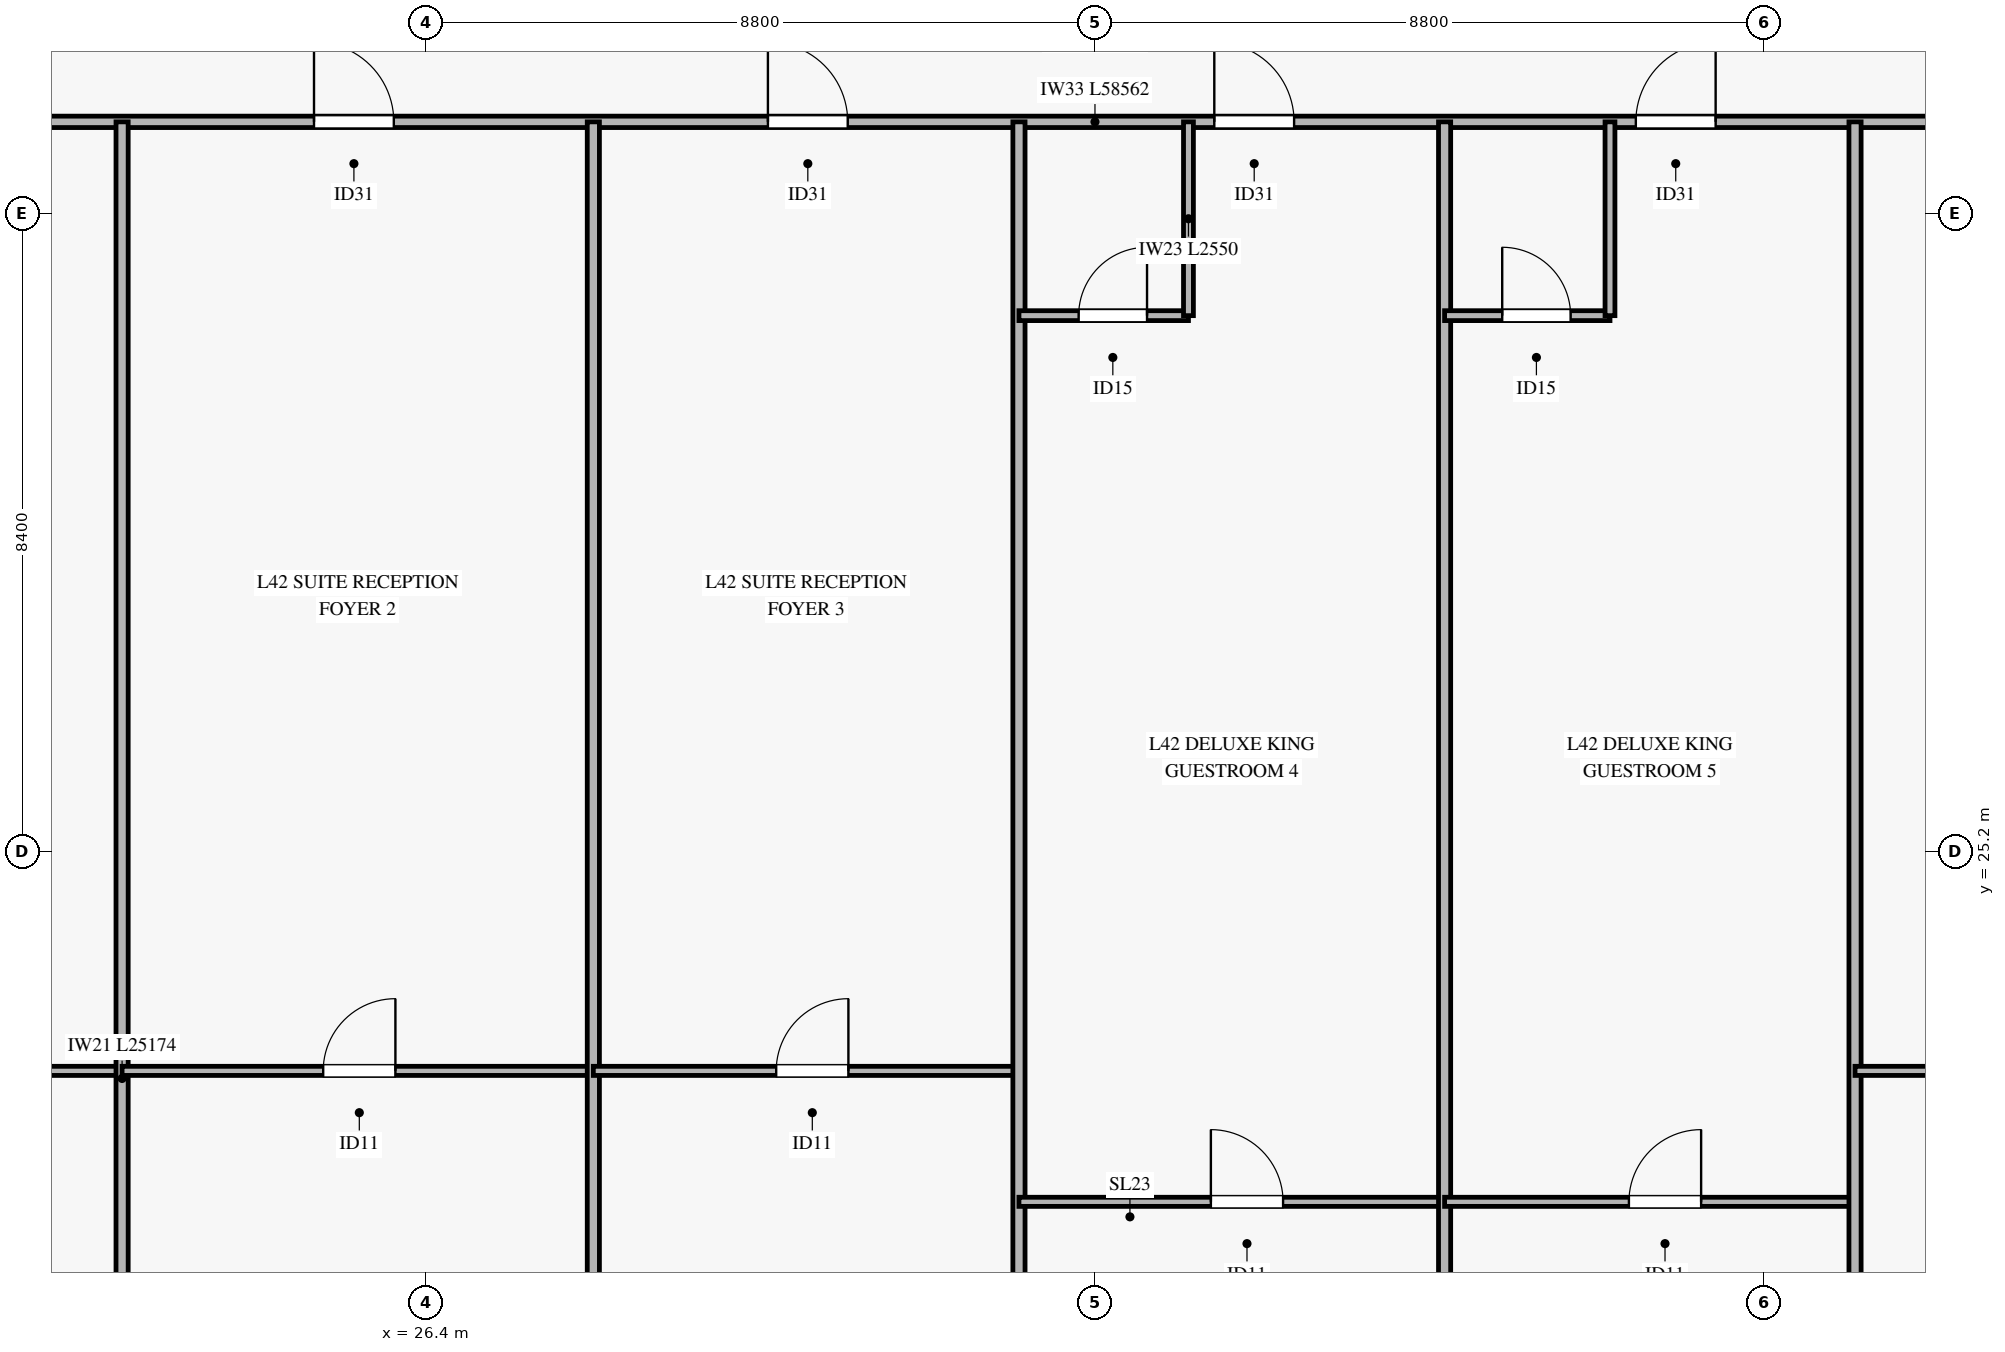
"""IFC4 building model, lengths in metres.
Left out: names, types, materials, properties, quantities, classifications, styles, units other than length and angle.
Written with IfcOpenShell. Run it as: python <this file> out.ifc"""

import sys

from ifc_helpers import new_model, si_unit, direction, frame, frame_2d, origin, place, context, subcontext, project, spatial, rectangle, extrude, source, transform, mapped, element, fill, save


model = new_model("IFC4")
c1 = context("Model", 3, precision=1e-05, world=origin(), true_north=direction((0.0, 1.0)))
c2 = subcontext(c1, "Body", "Model", "MODEL_VIEW")
j1 = project(units=[si_unit("LENGTHUNIT", "METRE"), si_unit("PLANEANGLEUNIT", "RADIAN")], contexts=[c1])
p1 = place(None, origin())
s1 = spatial("IfcSite", under=j1, at=p1, CompositionType="ELEMENT")
p2 = place(p1, origin())
s2 = spatial("IfcBuilding", under=s1, at=p2, CompositionType="ELEMENT")
p3 = place(p2, frame((0.0, 0.0, 170.2)))
s3 = spatial("IfcBuildingStorey", under=s2, at=p3, CompositionType="ELEMENT", Elevation=170.2)
p4 = place(p3, frame((5.919, 34.8, 0.0), z_axis=(0.0, 0.0, 1.0), x_axis=(1.0, 0.0, 0.0)))
e1 = element("IfcWall", 1, at=p4, inside=s3, PredefinedType="PARTITIONING", context=c2, shape_type="SweptSolid", body=[
    extrude(rectangle(XDim=58.562, YDim=0.15, at=frame_2d((29.281, 0.0))), origin(), (0.0, 0.0, 1.0), 2.455),
])
p5 = place(p4, frame((6.556, 0.0, 0.0)))
e2 = element("IfcOpeningElement", 2, at=p5, cuts=e1, PredefinedType="OPENING", context=c2, shape_type="SweptSolid", body=[
    extrude(rectangle(XDim=1.05, YDim=2.15, at=frame_2d((0.525, 1.075))), frame((0.0, 0.085, 0.0), z_axis=(0.0, -1.0, 0.0), x_axis=(1.0, 0.0, 0.0)), (0.0, 0.0, 1.0), 0.17),
])
p6 = place(p4, frame((19.006, 0.0, 0.0)))
e3 = element("IfcOpeningElement", 3, at=p6, cuts=e1, PredefinedType="OPENING", context=c2, shape_type="SweptSolid", body=[
    extrude(rectangle(XDim=1.05, YDim=2.15, at=frame_2d((0.525, 1.075))), frame((0.0, 0.085, 0.0), z_axis=(0.0, -1.0, 0.0), x_axis=(1.0, 0.0, 0.0)), (0.0, 0.0, 1.0), 0.17),
])
p7 = place(p4, frame((24.978, 0.0, 0.0)))
e4 = element("IfcOpeningElement", 4, at=p7, cuts=e1, PredefinedType="OPENING", context=c2, shape_type="SweptSolid", body=[
    extrude(rectangle(XDim=1.05, YDim=2.15, at=frame_2d((0.525, 1.075))), frame((0.0, 0.085, 0.0), z_axis=(0.0, -1.0, 0.0), x_axis=(1.0, 0.0, 0.0)), (0.0, 0.0, 1.0), 0.17),
])
p8 = place(p4, frame((30.851, 0.0, 0.0)))
e5 = element("IfcOpeningElement", 5, at=p8, cuts=e1, PredefinedType="OPENING", context=c2, shape_type="SweptSolid", body=[
    extrude(rectangle(XDim=1.05, YDim=2.15, at=frame_2d((0.525, 1.075))), frame((0.0, 0.085, 0.0), z_axis=(0.0, -1.0, 0.0), x_axis=(1.0, 0.0, 0.0)), (0.0, 0.0, 1.0), 0.17),
])
p9 = place(p4, frame((36.397, 0.0, 0.0)))
e6 = element("IfcOpeningElement", 6, at=p9, cuts=e1, PredefinedType="OPENING", context=c2, shape_type="SweptSolid", body=[
    extrude(rectangle(XDim=1.05, YDim=2.15, at=frame_2d((0.525, 1.075))), frame((0.0, 0.085, 0.0), z_axis=(0.0, -1.0, 0.0), x_axis=(1.0, 0.0, 0.0)), (0.0, 0.0, 1.0), 0.17),
])
p10 = place(p4, frame((46.701, 0.0, 0.0)))
e7 = element("IfcOpeningElement", 7, at=p10, cuts=e1, PredefinedType="OPENING", context=c2, shape_type="SweptSolid", body=[
    extrude(rectangle(XDim=1.05, YDim=2.15, at=frame_2d((0.525, 1.075))), frame((0.0, 0.085, 0.0), z_axis=(0.0, -1.0, 0.0), x_axis=(1.0, 0.0, 0.0)), (0.0, 0.0, 1.0), 0.17),
])
p11 = place(p3, frame((5.919, 22.313, 0.0), z_axis=(0.0, 0.0, 1.0), x_axis=(1.0, 0.0, 0.0)))
e8 = element("IfcWall", 8, at=p11, inside=s3, PredefinedType="PARTITIONING", context=c2, shape_type="SweptSolid", body=[
    extrude(rectangle(XDim=16.481, YDim=0.12, at=frame_2d((8.24, 0.0))), origin(), (0.0, 0.0, 1.0), 2.455),
])
p12 = place(p11, frame((6.878, 0.0, 0.0)))
e9 = element("IfcOpeningElement", 9, at=p12, cuts=e8, PredefinedType="OPENING", context=c2, shape_type="SweptSolid", body=[
    extrude(rectangle(XDim=0.95, YDim=2.1, at=frame_2d((0.475, 1.05))), frame((0.0, 0.07, 0.0), z_axis=(0.0, -1.0, 0.0), x_axis=(1.0, 0.0, 0.0)), (0.0, 0.0, 1.0), 0.14),
])
p13 = place(p3, frame((22.4, 9.626, 0.0), z_axis=(0.0, 0.0, 1.0), x_axis=(0.0, 1.0, 0.0)))
e10 = element("IfcWall", 10, at=p13, inside=s3, PredefinedType="PARTITIONING", context=c2, shape_type="SweptSolid", body=[
    extrude(rectangle(XDim=25.174, YDim=0.16, at=frame_2d((12.587, 0.0))), origin(), (0.0, 0.0, 1.0), 2.755),
])
p14 = place(p3, frame((22.4, 22.313, 0.0), z_axis=(0.0, 0.0, 1.0), x_axis=(1.0, 0.0, 0.0)))
e11 = element("IfcWall", 11, at=p14, inside=s3, PredefinedType="PARTITIONING", context=c2, shape_type="SweptSolid", body=[
    extrude(rectangle(XDim=6.2, YDim=0.12, at=frame_2d((3.1, 0.0))), origin(), (0.0, 0.0, 1.0), 3.27),
])
p15 = place(p14, frame((2.646, 0.0, 0.0)))
e12 = element("IfcOpeningElement", 12, at=p15, cuts=e11, PredefinedType="OPENING", context=c2, shape_type="SweptSolid", body=[
    extrude(rectangle(XDim=0.95, YDim=2.1, at=frame_2d((0.475, 1.05))), frame((0.0, 0.07, 0.0), z_axis=(0.0, -1.0, 0.0), x_axis=(1.0, 0.0, 0.0)), (0.0, 0.0, 1.0), 0.14),
])
p16 = place(p3, frame((28.6, 9.626, 0.0), z_axis=(0.0, 0.0, 1.0), x_axis=(0.0, 1.0, 0.0)))
e13 = element("IfcWall", 13, at=p16, inside=s3, PredefinedType="PARTITIONING", context=c2, shape_type="SweptSolid", body=[
    extrude(rectangle(XDim=25.174, YDim=0.16, at=frame_2d((12.587, 0.0))), origin(), (0.0, 0.0, 1.0), 2.755),
])
p17 = place(p3, frame((28.6, 22.313, 0.0), z_axis=(0.0, 0.0, 1.0), x_axis=(1.0, 0.0, 0.0)))
e14 = element("IfcWall", 14, at=p17, inside=s3, PredefinedType="PARTITIONING", context=c2, shape_type="SweptSolid", body=[
    extrude(rectangle(XDim=5.6, YDim=0.12, at=frame_2d((2.8, 0.0))), origin(), (0.0, 0.0, 1.0), 2.455),
])
p18 = place(p17, frame((2.406, 0.0, 0.0)))
e15 = element("IfcOpeningElement", 15, at=p18, cuts=e14, PredefinedType="OPENING", context=c2, shape_type="SweptSolid", body=[
    extrude(rectangle(XDim=0.95, YDim=2.1, at=frame_2d((0.475, 1.05))), frame((0.0, 0.07, 0.0), z_axis=(0.0, -1.0, 0.0), x_axis=(1.0, 0.0, 0.0)), (0.0, 0.0, 1.0), 0.14),
])
p19 = place(p3, frame((34.2, 9.626, 0.0), z_axis=(0.0, 0.0, 1.0), x_axis=(0.0, 1.0, 0.0)))
e16 = element("IfcWall", 16, at=p19, inside=s3, PredefinedType="PARTITIONING", context=c2, shape_type="SweptSolid", body=[
    extrude(rectangle(XDim=25.174, YDim=0.16, at=frame_2d((12.587, 0.0))), origin(), (0.0, 0.0, 1.0), 2.755),
])
p20 = place(p3, frame((34.2, 32.25, 0.0), z_axis=(0.0, 0.0, 1.0), x_axis=(1.0, 0.0, 0.0)))
e17 = element("IfcWall", 17, at=p20, inside=s3, PredefinedType="PARTITIONING", context=c2, shape_type="SweptSolid", body=[
    extrude(rectangle(XDim=2.23, YDim=0.13, at=frame_2d((1.115, 0.0))), origin(), (0.0, 0.0, 1.0), 3.27),
])
p21 = place(p20, frame((0.785, 0.0, 0.0)))
e18 = element("IfcOpeningElement", 18, at=p21, cuts=e17, PredefinedType="OPENING", context=c2, shape_type="SweptSolid", body=[
    extrude(rectangle(XDim=0.9, YDim=2.1, at=frame_2d((0.45, 1.05))), frame((0.0, 0.075, 0.0), z_axis=(0.0, -1.0, 0.0), x_axis=(1.0, 0.0, 0.0)), (0.0, 0.0, 1.0), 0.15),
])
p22 = place(p3, frame((36.43, 32.25, 0.0), z_axis=(0.0, 0.0, 1.0), x_axis=(0.0, 1.0, 0.0)))
e19 = element("IfcWall", 19, at=p22, inside=s3, PredefinedType="PARTITIONING", context=c2, shape_type="SweptSolid", body=[
    extrude(rectangle(XDim=2.55, YDim=0.13, at=frame_2d((1.275, 0.0))), origin(), (0.0, 0.0, 1.0), 2.805),
])
p23 = place(p3, frame((34.2, 20.59, 0.0), z_axis=(0.0, 0.0, 1.0), x_axis=(1.0, 0.0, 0.0)))
e20 = element("IfcWall", 20, at=p23, inside=s3, PredefinedType="PARTITIONING", context=c2, shape_type="SweptSolid", body=[
    extrude(rectangle(XDim=5.6, YDim=0.12, at=frame_2d((2.8, 0.0))), origin(), (0.0, 0.0, 1.0), 2.455),
])
p24 = place(p23, frame((2.525, 0.0, 0.0)))
e21 = element("IfcOpeningElement", 21, at=p24, cuts=e20, PredefinedType="OPENING", context=c2, shape_type="SweptSolid", body=[
    extrude(rectangle(XDim=0.95, YDim=2.1, at=frame_2d((0.475, 1.05))), frame((0.0, 0.07, 0.0), z_axis=(0.0, -1.0, 0.0), x_axis=(1.0, 0.0, 0.0)), (0.0, 0.0, 1.0), 0.14),
])
p25 = place(p3, frame((39.8, 9.626, 0.0), z_axis=(0.0, 0.0, 1.0), x_axis=(0.0, 1.0, 0.0)))
e22 = element("IfcWall", 22, at=p25, inside=s3, PredefinedType="PARTITIONING", context=c2, shape_type="SweptSolid", body=[
    extrude(rectangle(XDim=25.174, YDim=0.16, at=frame_2d((12.587, 0.0))), origin(), (0.0, 0.0, 1.0), 2.755),
])
p26 = place(p3, frame((39.8, 32.25, 0.0), z_axis=(0.0, 0.0, 1.0), x_axis=(1.0, 0.0, 0.0)))
e23 = element("IfcWall", 23, at=p26, inside=s3, PredefinedType="PARTITIONING", context=c2, shape_type="SweptSolid", body=[
    extrude(rectangle(XDim=2.176, YDim=0.13, at=frame_2d((1.088, 0.0))), origin(), (0.0, 0.0, 1.0), 3.27),
])
p27 = place(p26, frame((0.758, 0.0, 0.0)))
e24 = element("IfcOpeningElement", 24, at=p27, cuts=e23, PredefinedType="OPENING", context=c2, shape_type="SweptSolid", body=[
    extrude(rectangle(XDim=0.9, YDim=2.1, at=frame_2d((0.45, 1.05))), frame((0.0, 0.075, 0.0), z_axis=(0.0, -1.0, 0.0), x_axis=(1.0, 0.0, 0.0)), (0.0, 0.0, 1.0), 0.15),
])
p28 = place(p3, frame((41.976, 32.25, 0.0), z_axis=(0.0, 0.0, 1.0), x_axis=(0.0, 1.0, 0.0)))
e25 = element("IfcWall", 25, at=p28, inside=s3, PredefinedType="PARTITIONING", context=c2, shape_type="SweptSolid", body=[
    extrude(rectangle(XDim=2.55, YDim=0.13, at=frame_2d((1.275, 0.0))), origin(), (0.0, 0.0, 1.0), 2.805),
])
p29 = place(p3, frame((39.8, 20.59, 0.0), z_axis=(0.0, 0.0, 1.0), x_axis=(1.0, 0.0, 0.0)))
e26 = element("IfcWall", 26, at=p29, inside=s3, PredefinedType="PARTITIONING", context=c2, shape_type="SweptSolid", body=[
    extrude(rectangle(XDim=5.4, YDim=0.12, at=frame_2d((2.7, 0.0))), origin(), (0.0, 0.0, 1.0), 2.455),
])
p30 = place(p29, frame((2.425, 0.0, 0.0)))
e27 = element("IfcOpeningElement", 27, at=p30, cuts=e26, PredefinedType="OPENING", context=c2, shape_type="SweptSolid", body=[
    extrude(rectangle(XDim=0.95, YDim=2.1, at=frame_2d((0.475, 1.05))), frame((0.0, 0.07, 0.0), z_axis=(0.0, -1.0, 0.0), x_axis=(1.0, 0.0, 0.0)), (0.0, 0.0, 1.0), 0.14),
])
p31 = place(p3, frame((45.2, 9.626, 0.0), z_axis=(0.0, 0.0, 1.0), x_axis=(0.0, 1.0, 0.0)))
e28 = element("IfcWall", 28, at=p31, inside=s3, PredefinedType="PARTITIONING", context=c2, shape_type="SweptSolid", body=[
    extrude(rectangle(XDim=25.174, YDim=0.16, at=frame_2d((12.587, 0.0))), origin(), (0.0, 0.0, 1.0), 2.755),
])
p32 = place(p3, frame((45.2, 22.313, 0.0), z_axis=(0.0, 0.0, 1.0), x_axis=(1.0, 0.0, 0.0)))
e29 = element("IfcWall", 29, at=p32, inside=s3, PredefinedType="PARTITIONING", context=c2, shape_type="SweptSolid", body=[
    extrude(rectangle(XDim=19.281, YDim=0.12, at=frame_2d((9.641, 0.0))), origin(), (0.0, 0.0, 1.0), 2.455),
])
p33 = place(p32, frame((7.798, 0.0, 0.0)))
e30 = element("IfcOpeningElement", 30, at=p33, cuts=e29, PredefinedType="OPENING", context=c2, shape_type="SweptSolid", body=[
    extrude(rectangle(XDim=0.95, YDim=2.1, at=frame_2d((0.475, 1.05))), frame((0.0, 0.07, 0.0), z_axis=(0.0, -1.0, 0.0), x_axis=(1.0, 0.0, 0.0)), (0.0, 0.0, 1.0), 0.14),
])
m1 = source(origin(), c2, "Body", "SweptSolid", [
    extrude(rectangle(XDim=1.05, YDim=2.15, at=frame_2d((0.525, 1.075))), frame((0.0, 0.025, 0.0), z_axis=(0.0, -1.0, 0.0), x_axis=(1.0, 0.0, 0.0)), (0.0, 0.0, 1.0), 0.05),
])
p34 = place(p6, origin())
e31 = element("IfcDoor", 31, at=p34, inside=s3, OperationType="SINGLE_SWING_LEFT", PredefinedType="DOOR", context=c2, shape_type="MappedRepresentation", body=[
    mapped(m1, transform((0.0, 0.0, 0.0), x_axis=(1.0, 0.0, 0.0), y_axis=(0.0, 1.0, 0.0), z_axis=(0.0, 0.0, 1.0), scale=1.0)),
])
fill(e3, e31)
m2 = source(origin(), c2, "Body", "SweptSolid", [
    extrude(rectangle(XDim=0.95, YDim=2.1, at=frame_2d((0.475, 1.05))), frame((0.0, 0.025, 0.0), z_axis=(0.0, -1.0, 0.0), x_axis=(1.0, 0.0, 0.0)), (0.0, 0.0, 1.0), 0.05),
])
p35 = place(p15, origin())
e32 = element("IfcDoor", 32, at=p35, inside=s3, OperationType="SINGLE_SWING_RIGHT", PredefinedType="DOOR", context=c2, shape_type="MappedRepresentation", body=[
    mapped(m2, transform((0.0, 0.0, 0.0), x_axis=(1.0, 0.0, 0.0), y_axis=(0.0, 1.0, 0.0), z_axis=(0.0, 0.0, 1.0), scale=1.0)),
])
fill(e12, e32)
p36 = place(p7, origin())
e33 = element("IfcDoor", 33, at=p36, inside=s3, OperationType="SINGLE_SWING_LEFT", PredefinedType="DOOR", context=c2, shape_type="MappedRepresentation", body=[
    mapped(m1, transform((0.0, 0.0, 0.0), x_axis=(1.0, 0.0, 0.0), y_axis=(0.0, 1.0, 0.0), z_axis=(0.0, 0.0, 1.0), scale=1.0)),
])
fill(e4, e33)
p37 = place(p18, origin())
e34 = element("IfcDoor", 34, at=p37, inside=s3, OperationType="SINGLE_SWING_RIGHT", PredefinedType="DOOR", context=c2, shape_type="MappedRepresentation", body=[
    mapped(m2, transform((0.0, 0.0, 0.0), x_axis=(1.0, 0.0, 0.0), y_axis=(0.0, 1.0, 0.0), z_axis=(0.0, 0.0, 1.0), scale=1.0)),
])
fill(e15, e34)
p38 = place(p8, origin())
e35 = element("IfcDoor", 35, at=p38, inside=s3, OperationType="SINGLE_SWING_LEFT", PredefinedType="DOOR", context=c2, shape_type="MappedRepresentation", body=[
    mapped(m1, transform((0.0, 0.0, 0.0), x_axis=(1.0, 0.0, 0.0), y_axis=(0.0, 1.0, 0.0), z_axis=(0.0, 0.0, 1.0), scale=1.0)),
])
fill(e5, e35)
m3 = source(origin(), c2, "Body", "SweptSolid", [
    extrude(rectangle(XDim=0.9, YDim=2.1, at=frame_2d((0.45, 1.05))), frame((0.0, 0.025, 0.0), z_axis=(0.0, -1.0, 0.0), x_axis=(1.0, 0.0, 0.0)), (0.0, 0.0, 1.0), 0.05),
])
p39 = place(p21, origin())
e36 = element("IfcDoor", 36, at=p39, inside=s3, OperationType="SINGLE_SWING_RIGHT", PredefinedType="DOOR", context=c2, shape_type="MappedRepresentation", body=[
    mapped(m3, transform((0.0, 0.0, 0.0), x_axis=(1.0, 0.0, 0.0), y_axis=(0.0, 1.0, 0.0), z_axis=(0.0, 0.0, 1.0), scale=1.0)),
])
fill(e18, e36)
p40 = place(p24, origin())
e37 = element("IfcDoor", 37, at=p40, inside=s3, OperationType="SINGLE_SWING_LEFT", PredefinedType="DOOR", context=c2, shape_type="MappedRepresentation", body=[
    mapped(m2, transform((0.0, 0.0, 0.0), x_axis=(1.0, 0.0, 0.0), y_axis=(0.0, 1.0, 0.0), z_axis=(0.0, 0.0, 1.0), scale=1.0)),
])
fill(e21, e37)
p41 = place(p9, origin())
e38 = element("IfcDoor", 38, at=p41, inside=s3, OperationType="SINGLE_SWING_RIGHT", PredefinedType="DOOR", context=c2, shape_type="MappedRepresentation", body=[
    mapped(m1, transform((0.0, 0.0, 0.0), x_axis=(1.0, 0.0, 0.0), y_axis=(0.0, 1.0, 0.0), z_axis=(0.0, 0.0, 1.0), scale=1.0)),
])
fill(e6, e38)
p42 = place(p27, origin())
e39 = element("IfcDoor", 39, at=p42, inside=s3, OperationType="SINGLE_SWING_LEFT", PredefinedType="DOOR", context=c2, shape_type="MappedRepresentation", body=[
    mapped(m3, transform((0.0, 0.0, 0.0), x_axis=(1.0, 0.0, 0.0), y_axis=(0.0, 1.0, 0.0), z_axis=(0.0, 0.0, 1.0), scale=1.0)),
])
fill(e24, e39)
p43 = place(p30, origin())
e40 = element("IfcDoor", 40, at=p43, inside=s3, OperationType="SINGLE_SWING_RIGHT", PredefinedType="DOOR", context=c2, shape_type="MappedRepresentation", body=[
    mapped(m2, transform((0.0, 0.0, 0.0), x_axis=(1.0, 0.0, 0.0), y_axis=(0.0, 1.0, 0.0), z_axis=(0.0, 0.0, 1.0), scale=1.0)),
])
fill(e27, e40)
save(model, sys.argv[1])
